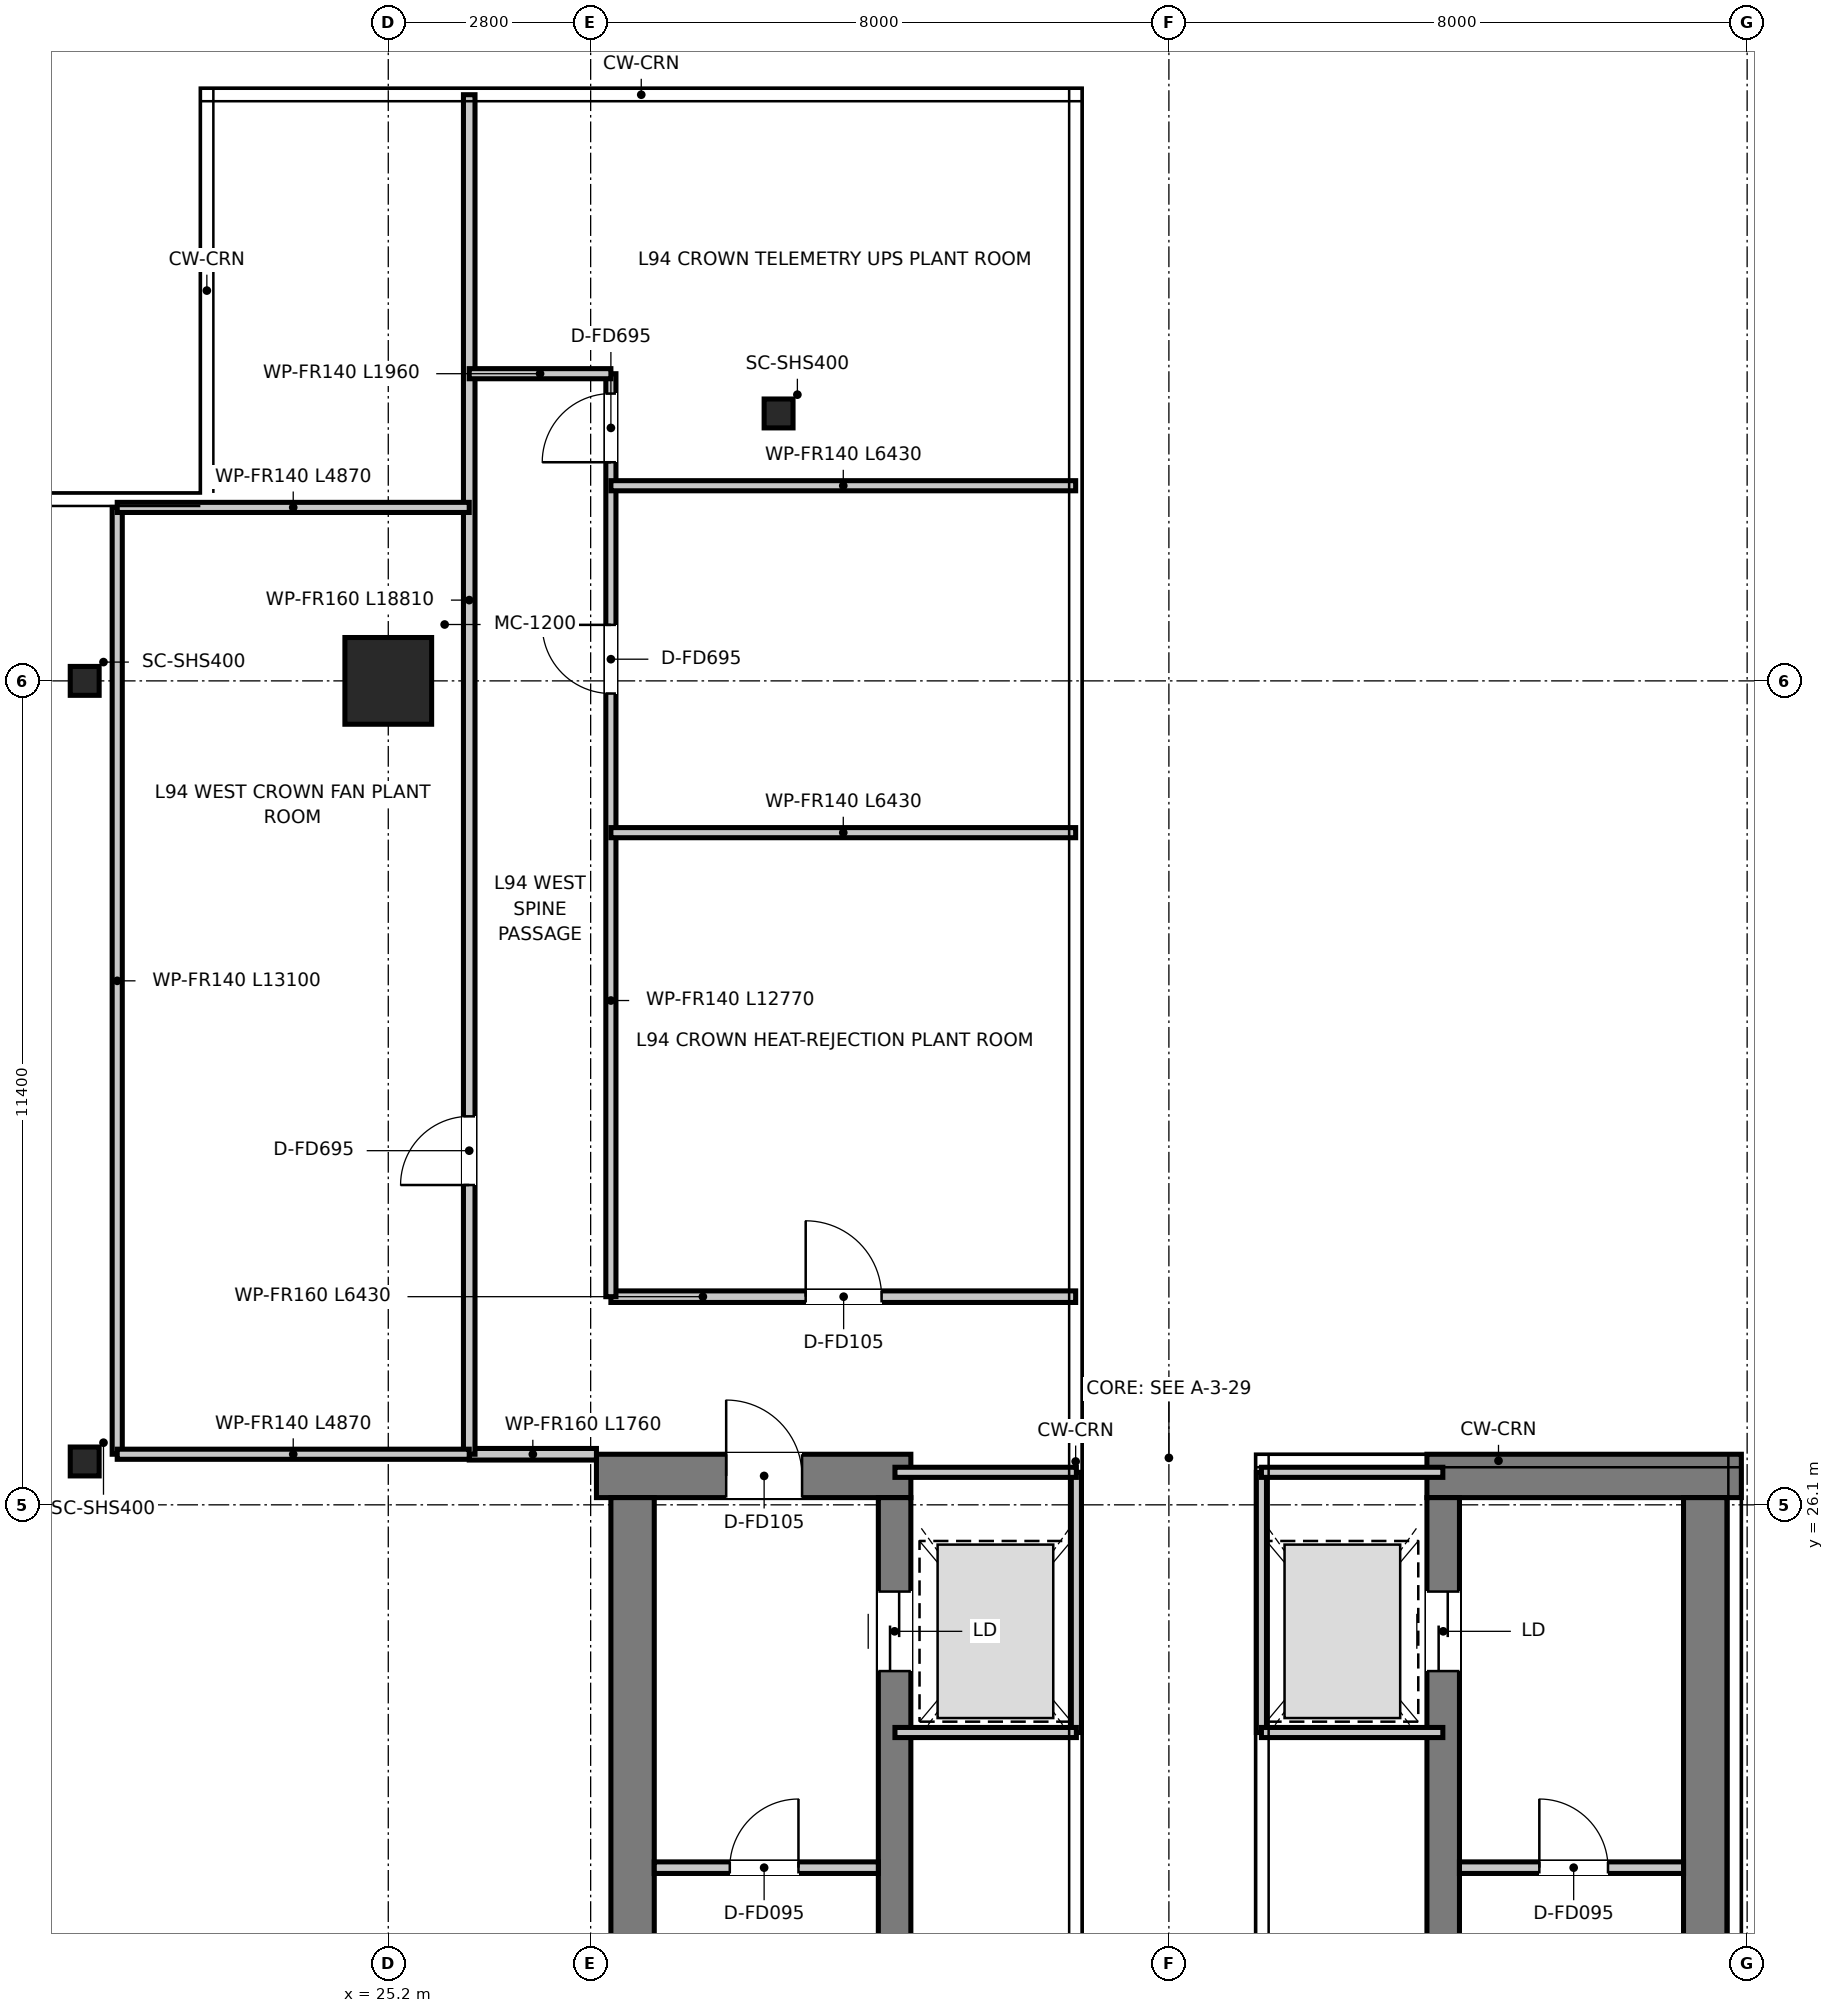
"""IFC4 building model, lengths in metres.
Left out: names, types, materials, properties, quantities, classifications, styles, units other than length and angle.
Written with IfcOpenShell. Run it as: python <this file> out.ifc"""

import sys

from ifc_helpers import new_model, si_unit, direction, frame, frame_2d, origin, origin_2d, place, context, subcontext, project, spatial, rectangle, hollow_rectangle, extrude, source, transform, mapped, element, fill, save


model = new_model("IFC4")
c1 = context("Model", 3, precision=1e-05, world=origin(), true_north=direction((0.0, 1.0)))
c2 = subcontext(c1, "Body", "Model", "MODEL_VIEW")
j1 = project(units=[si_unit("LENGTHUNIT", "METRE"), si_unit("PLANEANGLEUNIT", "RADIAN")], contexts=[c1])
p1 = place(None, origin())
s1 = spatial("IfcSite", under=j1, at=p1, CompositionType="ELEMENT")
p2 = place(p1, origin())
s2 = spatial("IfcBuilding", under=s1, at=p2, CompositionType="ELEMENT")
p3 = place(p2, frame((0.0, 0.0, 381.85)))
s3 = spatial("IfcBuildingStorey", under=s2, at=p3, CompositionType="ELEMENT", Elevation=381.85)
p4 = place(p3, frame((28.08, 26.5, 0.0), z_axis=(0.0, 0.0, 1.0), x_axis=(1.0, 0.0, 0.0)))
e1 = element("IfcWall", 1, at=p4, inside=s3, PredefinedType="SHEAR", context=c2, shape_type="SweptSolid", body=[
    extrude(rectangle(XDim=4.35, YDim=0.6, at=frame_2d((2.175, 0.0))), origin(), (0.0, 0.0, 1.0), 3.6),
])
p5 = place(p4, frame((1.795, 0.0, 0.0)))
e2 = element("IfcOpeningElement", 2, at=p5, cuts=e1, PredefinedType="OPENING", context=c2, shape_type="SweptSolid", body=[
    extrude(rectangle(XDim=1.05, YDim=2.1, at=frame_2d((0.525, 1.05))), frame((0.0, 0.31, 0.0), z_axis=(0.0, -1.0, 0.0), x_axis=(1.0, 0.0, 0.0)), (0.0, 0.0, 1.0), 0.62),
])
p6 = place(p3, frame((28.58, 11.1, 0.0), z_axis=(0.0, 0.0, 1.0), x_axis=(0.0, 1.0, 0.0)))
e3 = element("IfcWall", 3, at=p6, inside=s3, PredefinedType="SHEAR", context=c2, shape_type="SweptSolid", body=[
    extrude(rectangle(XDim=15.1, YDim=0.6, at=frame_2d((7.55, 0.0))), origin(), (0.0, 0.0, 1.0), 3.6),
])
p7 = place(p3, frame((32.205, 13.22, 0.0), z_axis=(0.0, 0.0, 1.0), x_axis=(0.0, 1.0, 0.0)))
e4 = element("IfcWall", 4, at=p7, inside=s3, PredefinedType="SHEAR", context=c2, shape_type="SweptSolid", body=[
    extrude(rectangle(XDim=12.98, YDim=0.45, at=frame_2d((6.49, 0.0))), origin(), (0.0, 0.0, 1.0), 3.6),
])
p8 = place(p7, frame((10.58, 0.0, 0.0)))
e5 = element("IfcOpeningElement", 5, at=p8, cuts=e4, PredefinedType="OPENING", context=c2, shape_type="SweptSolid", body=[
    extrude(rectangle(XDim=1.1, YDim=2.15, at=frame_2d((0.55, 1.075))), frame((0.0, 0.235, 0.0), z_axis=(0.0, -1.0, 0.0), x_axis=(1.0, 0.0, 0.0)), (0.0, 0.0, 1.0), 0.47),
])
p9 = place(p3, frame((39.57, 26.5, 0.0), z_axis=(0.0, 0.0, 1.0), x_axis=(1.0, 0.0, 0.0)))
e6 = element("IfcWall", 6, at=p9, inside=s3, PredefinedType="SHEAR", context=c2, shape_type="SweptSolid", body=[
    extrude(rectangle(XDim=4.35, YDim=0.6, at=frame_2d((2.175, 0.0))), origin(), (0.0, 0.0, 1.0), 3.6),
])
p10 = place(p3, frame((39.795, 13.22, 0.0), z_axis=(0.0, 0.0, 1.0), x_axis=(0.0, 1.0, 0.0)))
e7 = element("IfcWall", 7, at=p10, inside=s3, PredefinedType="SHEAR", context=c2, shape_type="SweptSolid", body=[
    extrude(rectangle(XDim=12.98, YDim=0.45, at=frame_2d((6.49, 0.0))), origin(), (0.0, 0.0, 1.0), 3.6),
])
p11 = place(p10, frame((10.58, 0.0, 0.0)))
e8 = element("IfcOpeningElement", 8, at=p11, cuts=e7, PredefinedType="OPENING", context=c2, shape_type="SweptSolid", body=[
    extrude(rectangle(XDim=1.1, YDim=2.15, at=frame_2d((0.55, 1.075))), frame((0.0, 0.235, 0.0), z_axis=(0.0, -1.0, 0.0), x_axis=(1.0, 0.0, 0.0)), (0.0, 0.0, 1.0), 0.47),
])
p12 = place(p3, frame((43.42, 11.1, 0.0), z_axis=(0.0, 0.0, 1.0), x_axis=(0.0, 1.0, 0.0)))
e9 = element("IfcWall", 9, at=p12, inside=s3, PredefinedType="SHEAR", context=c2, shape_type="SweptSolid", body=[
    extrude(rectangle(XDim=15.1, YDim=0.6, at=frame_2d((7.55, 0.0))), origin(), (0.0, 0.0, 1.0), 3.6),
])
m1 = source(origin(), c2, "Body", "SweptSolid", [
    extrude(rectangle(XDim=1.2, YDim=1.2, at=origin_2d()), origin(), (0.0, 0.0, 1.0), 3.6),
])
p13 = place(p3, frame((25.2, 37.5, 0.0), z_axis=(0.0, 0.0, 1.0), x_axis=(1.0, 0.0, 0.0)))
e10 = element("IfcColumn", 10, at=p13, inside=s3, PredefinedType="USERDEFINED", context=c2, shape_type="MappedRepresentation", body=[
    mapped(m1, transform((0.0, 0.0, 0.0), x_axis=(1.0, 0.0, 0.0), y_axis=(0.0, 1.0, 0.0), z_axis=(0.0, 0.0, 1.0), scale=1.0)),
])
m2 = source(origin(), c2, "Body", "SweptSolid", [
    extrude(hollow_rectangle(XDim=0.4, YDim=0.4, WallThickness=0.025, at=origin_2d()), origin(), (0.0, 0.0, 1.0), 3.6),
])
for number, where, z_axis, x_axis in (
    (11, (21.0, 26.7, 0.0), (0.0, 0.0, 1.0), (1.0, 0.0, 0.0)),
    (12, (21.0, 37.5, 0.0), (0.0, 0.0, 1.0), (1.0, 0.0, 0.0)),
    (13, (30.6, 41.2, 0.0), (0.0, 0.0, 1.0), (1.0, 0.0, 0.0)),
):
    element("IfcColumn", number, at=place(p3, frame(where, z_axis=z_axis, x_axis=x_axis)), inside=s3, PredefinedType="COLUMN", context=c2, shape_type="MappedRepresentation", body=[
        mapped(m2, transform((0.0, 0.0, 0.0), x_axis=(1.0, 0.0, 0.0), y_axis=(0.0, 1.0, 0.0), z_axis=(0.0, 0.0, 1.0), scale=1.0)),
    ])
p14 = place(p3, frame((28.88, 21.08, 0.0), z_axis=(0.0, 0.0, 1.0), x_axis=(1.0, 0.0, 0.0)))
e14 = element("IfcWall", 14, at=p14, inside=s3, PredefinedType="PARTITIONING", context=c2, shape_type="SweptSolid", body=[
    extrude(rectangle(XDim=3.1, YDim=0.16, at=frame_2d((1.55, 0.0))), origin(), (0.0, 0.0, 1.0), 3.3),
])
p15 = place(p14, frame((1.045, 0.0, 0.0)))
e15 = element("IfcOpeningElement", 15, at=p15, cuts=e14, PredefinedType="OPENING", context=c2, shape_type="SweptSolid", body=[
    extrude(rectangle(XDim=0.95, YDim=2.1, at=frame_2d((0.475, 1.05))), frame((0.0, 0.09, 0.0), z_axis=(0.0, -1.0, 0.0), x_axis=(1.0, 0.0, 0.0)), (0.0, 0.0, 1.0), 0.18),
])
p16 = place(p3, frame((34.72, 22.95, 0.0), z_axis=(0.0, 0.0, 1.0), x_axis=(0.0, 1.0, 0.0)))
e16 = element("IfcWall", 16, at=p16, inside=s3, PredefinedType="PARTITIONING", context=c2, shape_type="SweptSolid", body=[
    extrude(rectangle(XDim=3.6, YDim=0.14, at=frame_2d((1.8, 0.0))), origin(), (0.0, 0.0, 1.0), 3.3),
])
for number, where, z_axis, x_axis in (
    (17, (32.21, 22.95, 0.0), (0.0, 0.0, 1.0), (1.0, 0.0, 0.0)),
    (18, (32.21, 26.55, 0.0), (0.0, 0.0, 1.0), (1.0, 0.0, 0.0)),
):
    element("IfcWall", number, at=place(p3, frame(where, z_axis=z_axis, x_axis=x_axis)), inside=s3, PredefinedType="PARTITIONING", context=c2, shape_type="SweptSolid", body=[
        extrude(rectangle(XDim=2.51, YDim=0.14, at=frame_2d((1.255, 0.0))), origin(), (0.0, 0.0, 1.0), 3.3),
    ])
p17 = place(p3, frame((40.02, 21.08, 0.0), z_axis=(0.0, 0.0, 1.0), x_axis=(1.0, 0.0, 0.0)))
e19 = element("IfcWall", 19, at=p17, inside=s3, PredefinedType="PARTITIONING", context=c2, shape_type="SweptSolid", body=[
    extrude(rectangle(XDim=3.1, YDim=0.16, at=frame_2d((1.55, 0.0))), origin(), (0.0, 0.0, 1.0), 3.3),
])
p18 = place(p17, frame((1.105, 0.0, 0.0)))
e20 = element("IfcOpeningElement", 20, at=p18, cuts=e19, PredefinedType="OPENING", context=c2, shape_type="SweptSolid", body=[
    extrude(rectangle(XDim=0.95, YDim=2.1, at=frame_2d((0.475, 1.05))), frame((0.0, 0.09, 0.0), z_axis=(0.0, -1.0, 0.0), x_axis=(1.0, 0.0, 0.0)), (0.0, 0.0, 1.0), 0.18),
])
p19 = place(p3, frame((37.28, 22.95, 0.0), z_axis=(0.0, 0.0, 1.0), x_axis=(0.0, 1.0, 0.0)))
e21 = element("IfcWall", 21, at=p19, inside=s3, PredefinedType="PARTITIONING", context=c2, shape_type="SweptSolid", body=[
    extrude(rectangle(XDim=3.6, YDim=0.14, at=frame_2d((1.8, 0.0))), origin(), (0.0, 0.0, 1.0), 3.3),
])
for number, where, z_axis, x_axis in (
    (22, (37.28, 22.95, 0.0), (0.0, 0.0, 1.0), (1.0, 0.0, 0.0)),
    (23, (37.28, 26.55, 0.0), (0.0, 0.0, 1.0), (1.0, 0.0, 0.0)),
):
    element("IfcWall", number, at=place(p3, frame(where, z_axis=z_axis, x_axis=x_axis)), inside=s3, PredefinedType="PARTITIONING", context=c2, shape_type="SweptSolid", body=[
        extrude(rectangle(XDim=2.51, YDim=0.14, at=frame_2d((1.255, 0.0))), origin(), (0.0, 0.0, 1.0), 3.3),
    ])
p20 = place(p3, frame((28.28, 28.98, 0.0), z_axis=(0.0, 0.0, 1.0), x_axis=(1.0, 0.0, 0.0)))
e24 = element("IfcWall", 24, at=p20, inside=s3, PredefinedType="PARTITIONING", context=c2, shape_type="SweptSolid", body=[
    extrude(rectangle(XDim=6.43, YDim=0.16, at=frame_2d((3.215, 0.0))), origin(), (0.0, 0.0, 1.0), 2.81),
])
p21 = place(p20, frame((2.695, 0.0, 0.0)))
e25 = element("IfcOpeningElement", 25, at=p21, cuts=e24, PredefinedType="OPENING", context=c2, shape_type="SweptSolid", body=[
    extrude(rectangle(XDim=1.05, YDim=2.1, at=frame_2d((0.525, 1.05))), frame((0.0, 0.09, 0.0), z_axis=(0.0, -1.0, 0.0), x_axis=(1.0, 0.0, 0.0)), (0.0, 0.0, 1.0), 0.18),
])
p22 = place(p3, frame((26.32, 26.8, 0.0), z_axis=(0.0, 0.0, 1.0), x_axis=(1.0, 0.0, 0.0)))
e26 = element("IfcWall", 26, at=p22, inside=s3, PredefinedType="PARTITIONING", context=c2, shape_type="SweptSolid", body=[
    extrude(rectangle(XDim=1.76, YDim=0.16, at=frame_2d((0.88, 0.0))), origin(), (0.0, 0.0, 1.0), 3.3),
])
p23 = place(p3, frame((26.32, 26.8, 0.0), z_axis=(0.0, 0.0, 1.0), x_axis=(0.0, 1.0, 0.0)))
e27 = element("IfcWall", 27, at=p23, inside=s3, PredefinedType="PARTITIONING", context=c2, shape_type="SweptSolid", body=[
    extrude(rectangle(XDim=18.81, YDim=0.16, at=frame_2d((9.405, 0.0))), origin(), (0.0, 0.0, 1.0), 2.81),
])
p24 = place(p23, frame((3.725, 0.0, 0.0)))
e28 = element("IfcOpeningElement", 28, at=p24, cuts=e27, PredefinedType="OPENING", context=c2, shape_type="SweptSolid", body=[
    extrude(rectangle(XDim=0.95, YDim=2.1, at=frame_2d((0.475, 1.05))), frame((0.0, 0.09, 0.0), z_axis=(0.0, -1.0, 0.0), x_axis=(1.0, 0.0, 0.0)), (0.0, 0.0, 1.0), 0.18),
])
p25 = place(p3, frame((21.45, 26.8, 0.0), z_axis=(0.0, 0.0, 1.0), x_axis=(0.0, 1.0, 0.0)))
e29 = element("IfcWall", 29, at=p25, inside=s3, PredefinedType="PARTITIONING", context=c2, shape_type="SweptSolid", body=[
    extrude(rectangle(XDim=13.1, YDim=0.14, at=frame_2d((6.55, 0.0))), origin(), (0.0, 0.0, 1.0), 2.81),
])
p26 = place(p3, frame((21.45, 26.8, 0.0), z_axis=(0.0, 0.0, 1.0), x_axis=(1.0, 0.0, 0.0)))
e30 = element("IfcWall", 30, at=p26, inside=s3, PredefinedType="PARTITIONING", context=c2, shape_type="SweptSolid", body=[
    extrude(rectangle(XDim=4.87, YDim=0.14, at=frame_2d((2.435, 0.0))), origin(), (0.0, 0.0, 1.0), 2.81),
])
p27 = place(p3, frame((21.45, 39.9, 0.0), z_axis=(0.0, 0.0, 1.0), x_axis=(1.0, 0.0, 0.0)))
e31 = element("IfcWall", 31, at=p27, inside=s3, PredefinedType="PARTITIONING", context=c2, shape_type="SweptSolid", body=[
    extrude(rectangle(XDim=4.87, YDim=0.14, at=frame_2d((2.435, 0.0))), origin(), (0.0, 0.0, 1.0), 3.3),
])
p28 = place(p3, frame((28.28, 28.98, 0.0), z_axis=(0.0, 0.0, 1.0), x_axis=(0.0, 1.0, 0.0)))
e32 = element("IfcWall", 32, at=p28, inside=s3, PredefinedType="PARTITIONING", context=c2, shape_type="SweptSolid", body=[
    extrude(rectangle(XDim=12.77, YDim=0.14, at=frame_2d((6.385, 0.0))), origin(), (0.0, 0.0, 1.0), 2.81),
])
p29 = place(p28, frame((8.345, 0.0, 0.0)))
e33 = element("IfcOpeningElement", 33, at=p29, cuts=e32, PredefinedType="OPENING", context=c2, shape_type="SweptSolid", body=[
    extrude(rectangle(XDim=0.95, YDim=2.1, at=frame_2d((0.475, 1.05))), frame((0.0, 0.08, 0.0), z_axis=(0.0, -1.0, 0.0), x_axis=(1.0, 0.0, 0.0)), (0.0, 0.0, 1.0), 0.16),
])
p30 = place(p28, frame((11.545, 0.0, 0.0)))
e34 = element("IfcOpeningElement", 34, at=p30, cuts=e32, PredefinedType="OPENING", context=c2, shape_type="SweptSolid", body=[
    extrude(rectangle(XDim=0.95, YDim=2.1, at=frame_2d((0.475, 1.05))), frame((0.0, 0.08, 0.0), z_axis=(0.0, -1.0, 0.0), x_axis=(1.0, 0.0, 0.0)), (0.0, 0.0, 1.0), 0.16),
])
for number, where, z_axis, x_axis in (
    (35, (28.28, 35.4, 0.0), (0.0, 0.0, 1.0), (1.0, 0.0, 0.0)),
    (36, (28.28, 40.2, 0.0), (0.0, 0.0, 1.0), (1.0, 0.0, 0.0)),
):
    element("IfcWall", number, at=place(p3, frame(where, z_axis=z_axis, x_axis=x_axis)), inside=s3, PredefinedType="PARTITIONING", context=c2, shape_type="SweptSolid", body=[
        extrude(rectangle(XDim=6.43, YDim=0.14, at=frame_2d((3.215, 0.0))), origin(), (0.0, 0.0, 1.0), 2.81),
    ])
p31 = place(p3, frame((26.32, 41.75, 0.0), z_axis=(0.0, 0.0, 1.0), x_axis=(1.0, 0.0, 0.0)))
e37 = element("IfcWall", 37, at=p31, inside=s3, PredefinedType="PARTITIONING", context=c2, shape_type="SweptSolid", body=[
    extrude(rectangle(XDim=1.96, YDim=0.14, at=frame_2d((0.98, 0.0))), origin(), (0.0, 0.0, 1.0), 3.3),
])
p32 = place(p15, origin())
e38 = element("IfcDoor", 38, at=p32, inside=s3, OperationType="SINGLE_SWING_RIGHT", PredefinedType="DOOR", context=c2, shape_type="SweptSolid", body=[
    extrude(rectangle(XDim=0.95, YDim=2.1, at=frame_2d((0.475, 1.05))), frame((0.0, 0.025, 0.0), z_axis=(0.0, -1.0, 0.0), x_axis=(1.0, 0.0, 0.0)), (0.0, 0.0, 1.0), 0.05),
])
fill(e15, e38)
p33 = place(p8, origin())
e39 = element("IfcDoor", 39, at=p33, inside=s3, OperationType="DOUBLE_DOOR_SLIDING", PredefinedType="DOOR", context=c2, shape_type="SweptSolid", body=[
    extrude(rectangle(XDim=1.1, YDim=2.15, at=frame_2d((0.55, 1.075))), frame((0.0, 0.025, 0.0), z_axis=(0.0, -1.0, 0.0), x_axis=(1.0, 0.0, 0.0)), (0.0, 0.0, 1.0), 0.05),
])
fill(e5, e39)
p34 = place(p5, origin())
e40 = element("IfcDoor", 40, at=p34, inside=s3, OperationType="SINGLE_SWING_LEFT", PredefinedType="DOOR", context=c2, shape_type="SweptSolid", body=[
    extrude(rectangle(XDim=1.05, YDim=2.1, at=frame_2d((0.525, 1.05))), frame((0.0, 0.025, 0.0), z_axis=(0.0, -1.0, 0.0), x_axis=(1.0, 0.0, 0.0)), (0.0, 0.0, 1.0), 0.05),
])
fill(e2, e40)
p35 = place(p18, origin())
e41 = element("IfcDoor", 41, at=p35, inside=s3, OperationType="SINGLE_SWING_LEFT", PredefinedType="DOOR", context=c2, shape_type="SweptSolid", body=[
    extrude(rectangle(XDim=0.95, YDim=2.1, at=frame_2d((0.475, 1.05))), frame((0.0, 0.025, 0.0), z_axis=(0.0, -1.0, 0.0), x_axis=(1.0, 0.0, 0.0)), (0.0, 0.0, 1.0), 0.05),
])
fill(e20, e41)
p36 = place(p11, origin())
e42 = element("IfcDoor", 42, at=p36, inside=s3, OperationType="DOUBLE_DOOR_SLIDING", PredefinedType="DOOR", context=c2, shape_type="SweptSolid", body=[
    extrude(rectangle(XDim=1.1, YDim=2.15, at=frame_2d((0.55, 1.075))), frame((0.0, 0.025, 0.0), z_axis=(0.0, -1.0, 0.0), x_axis=(1.0, 0.0, 0.0)), (0.0, 0.0, 1.0), 0.05),
])
fill(e8, e42)
p37 = place(p21, origin())
e43 = element("IfcDoor", 43, at=p37, inside=s3, OperationType="SINGLE_SWING_LEFT", PredefinedType="DOOR", context=c2, shape_type="SweptSolid", body=[
    extrude(rectangle(XDim=1.05, YDim=2.1, at=frame_2d((0.525, 1.05))), frame((0.0, 0.025, 0.0), z_axis=(0.0, -1.0, 0.0), x_axis=(1.0, 0.0, 0.0)), (0.0, 0.0, 1.0), 0.05),
])
fill(e25, e43)
p38 = place(p29, origin())
e44 = element("IfcDoor", 44, at=p38, inside=s3, OperationType="SINGLE_SWING_RIGHT", PredefinedType="DOOR", context=c2, shape_type="SweptSolid", body=[
    extrude(rectangle(XDim=0.95, YDim=2.1, at=frame_2d((0.475, 1.05))), frame((0.0, 0.025, 0.0), z_axis=(0.0, -1.0, 0.0), x_axis=(1.0, 0.0, 0.0)), (0.0, 0.0, 1.0), 0.05),
])
fill(e33, e44)
p39 = place(p30, origin())
e45 = element("IfcDoor", 45, at=p39, inside=s3, OperationType="SINGLE_SWING_LEFT", PredefinedType="DOOR", context=c2, shape_type="SweptSolid", body=[
    extrude(rectangle(XDim=0.95, YDim=2.1, at=frame_2d((0.475, 1.05))), frame((0.0, 0.025, 0.0), z_axis=(0.0, -1.0, 0.0), x_axis=(1.0, 0.0, 0.0)), (0.0, 0.0, 1.0), 0.05),
])
fill(e34, e45)
p40 = place(p24, origin())
e46 = element("IfcDoor", 46, at=p40, inside=s3, OperationType="SINGLE_SWING_LEFT", PredefinedType="DOOR", context=c2, shape_type="SweptSolid", body=[
    extrude(rectangle(XDim=0.95, YDim=2.1, at=frame_2d((0.475, 1.05))), frame((0.0, 0.025, 0.0), z_axis=(0.0, -1.0, 0.0), x_axis=(1.0, 0.0, 0.0)), (0.0, 0.0, 1.0), 0.05),
])
fill(e28, e46)
save(model, sys.argv[1])
